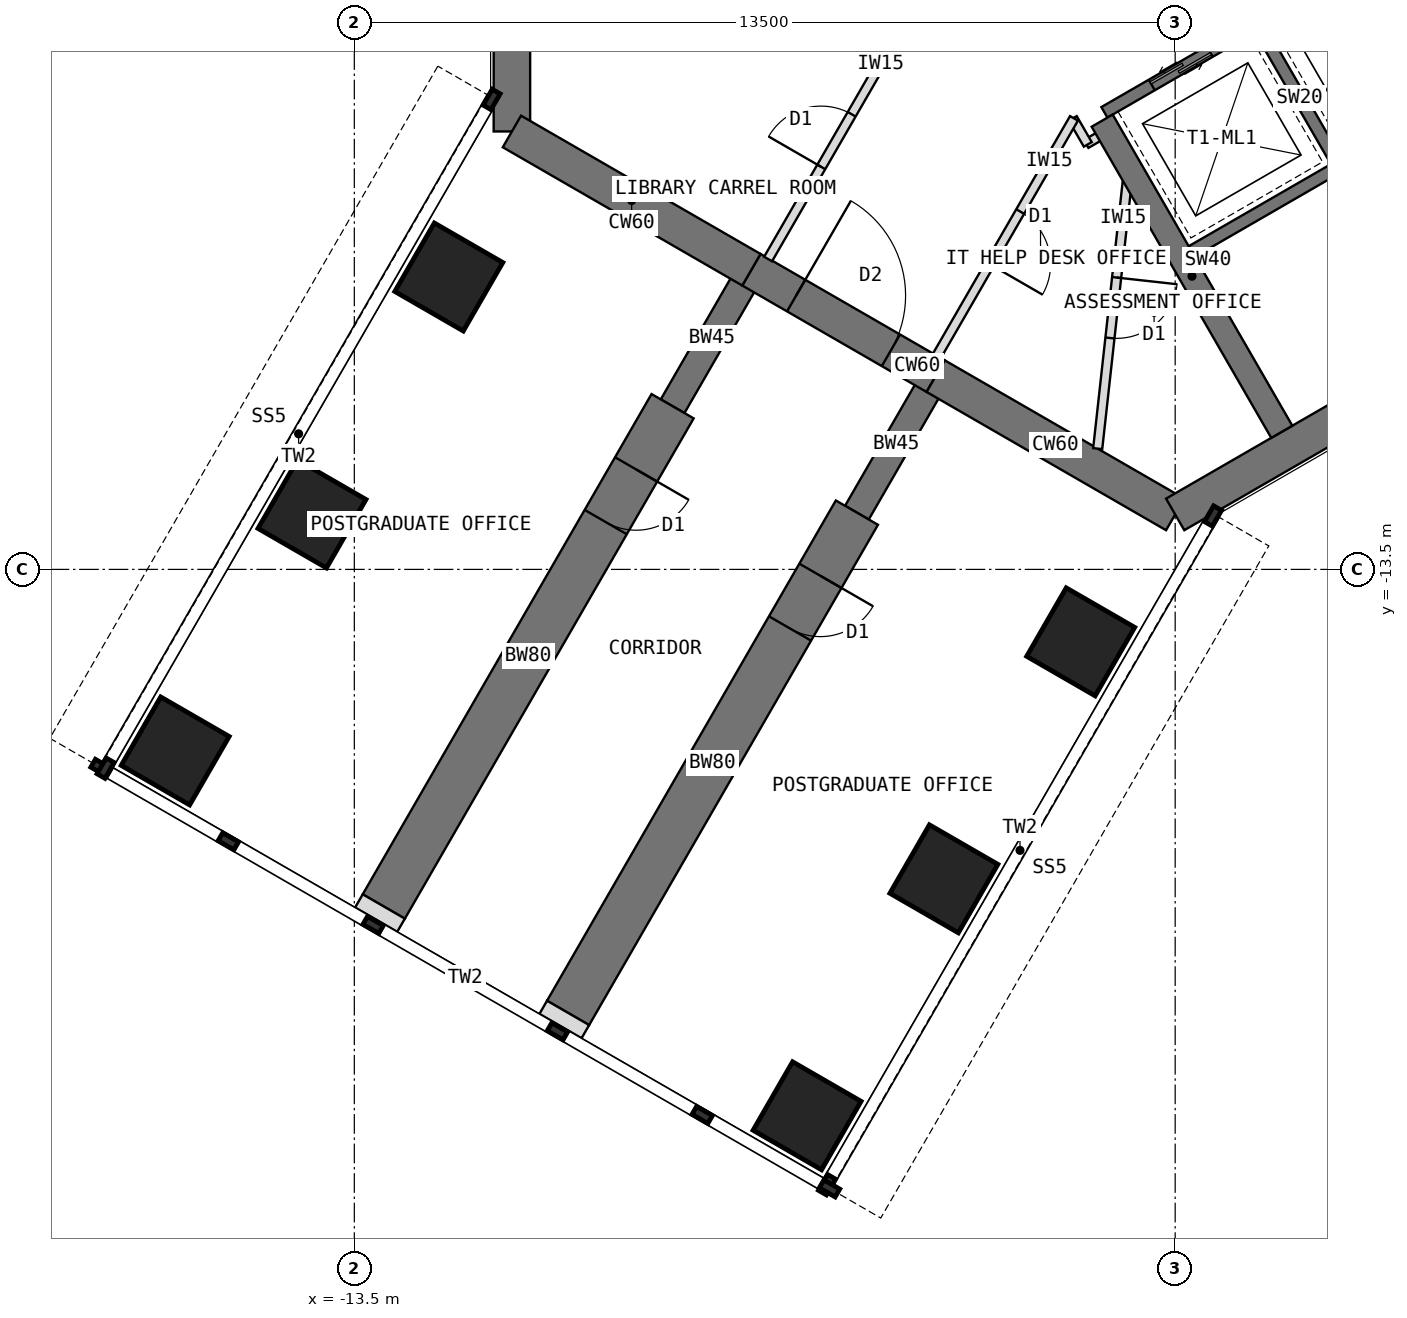
"""IFC4 building model, lengths in metres.
Left out: names, types, materials, properties, quantities, classifications, styles, units other than length and angle.
Written with IfcOpenShell. Run it as: python <this file> out.ifc"""

import sys

from ifc_helpers import new_model, si_unit, direction, frame, frame_2d, origin, origin_2d, place, context, subcontext, project, spatial, rectangle, extrude, element, fill, save


model = new_model("IFC4")
c1 = context("Model", 3, precision=1e-05, world=origin(), true_north=direction((0.0, 1.0)))
c2 = subcontext(c1, "Body", "Model", "MODEL_VIEW")
j1 = project(units=[si_unit("LENGTHUNIT", "METRE"), si_unit("PLANEANGLEUNIT", "RADIAN")], contexts=[c1])
p1 = place(None, origin())
s1 = spatial("IfcSite", under=j1, at=p1, CompositionType="ELEMENT")
p2 = place(p1, origin())
s2 = spatial("IfcBuilding", under=s1, at=p2, CompositionType="ELEMENT")
p3 = place(p2, frame((0.0, 0.0, 121.5)))
s3 = spatial("IfcBuildingStorey", under=s2, at=p3, CompositionType="ELEMENT", Elevation=121.5)
p4 = place(p3, frame((-10.908, 6.298, 0.0), z_axis=(0.0, 0.0, 1.0), x_axis=(0.0, -1.0, 0.0)))
e1 = element("IfcWall", 1, at=p4, inside=s3, PredefinedType="SHEAR", context=c2, shape_type="SweptSolid", body=[
    extrude(rectangle(XDim=12.596, YDim=0.6, at=frame_2d((6.298, 0.0))), origin(), (0.0, 0.0, 1.0), 4.0),
])
p5 = place(p3, frame((-10.908, -6.298, 0.0), z_axis=(0.0, 0.0, 1.0), x_axis=(0.866034513004, -0.499984222037, 0.0)))
e2 = element("IfcWall", 2, at=p5, inside=s3, PredefinedType="SHEAR", context=c2, shape_type="SweptSolid", body=[
    extrude(rectangle(XDim=4.548, YDim=0.6, at=frame_2d((2.274, 0.0))), origin(), (0.0, 0.0, 1.0), 4.0),
])
p6 = place(p3, frame((-6.97, -8.572, 0.0), z_axis=(0.0, 0.0, 1.0), x_axis=(0.866019471182, -0.500010275428, 0.0)))
e3 = element("IfcWall", 3, at=p6, inside=s3, PredefinedType="SHEAR", context=c2, shape_type="SweptSolid", body=[
    extrude(rectangle(XDim=3.5, YDim=0.6, at=frame_2d((1.75, 0.0))), origin(), (0.0, 0.0, 1.0), 4.0),
])
p7 = place(p6, frame((0.85, 0.0, 0.0)))
e4 = element("IfcOpeningElement", 4, at=p7, cuts=e3, PredefinedType="OPENING", context=c2, shape_type="SweptSolid", body=[
    extrude(rectangle(XDim=1.8, YDim=2.1, at=frame_2d((0.9, 1.05))), frame((0.0, 0.31, 0.0), z_axis=(0.0, -1.0, 0.0), x_axis=(1.0, 0.0, 0.0)), (0.0, 0.0, 1.0), 0.62),
])
p8 = place(p3, frame((-3.939, -10.322, 0.0), z_axis=(0.0, 0.0, 1.0), x_axis=(0.866011268655, -0.500024481964, 0.0)))
e5 = element("IfcWall", 5, at=p8, inside=s3, PredefinedType="SHEAR", context=c2, shape_type="SweptSolid", body=[
    extrude(rectangle(XDim=4.548, YDim=0.6, at=frame_2d((2.274, 0.0))), origin(), (0.0, 0.0, 1.0), 4.0),
])
p9 = place(p3, frame((0.0, -12.596, 0.0), z_axis=(0.0, 0.0, 1.0), x_axis=(0.866021940709, 0.500005998175, 0.0)))
e6 = element("IfcWall", 6, at=p9, inside=s3, PredefinedType="SHEAR", context=c2, shape_type="SweptSolid", body=[
    extrude(rectangle(XDim=12.596, YDim=0.6, at=frame_2d((6.298, 0.0))), origin(), (0.0, 0.0, 1.0), 4.0),
])
p10 = place(p3, frame((-3.939, -10.322, 0.0), z_axis=(0.0, 0.0, 1.0), x_axis=(-0.499918158782, -0.866072649678, 0.0)))
e7 = element("IfcWall", 7, at=p10, inside=s3, PredefinedType="SHEAR", context=c2, shape_type="SweptSolid", body=[
    extrude(rectangle(XDim=2.592, YDim=0.45, at=frame_2d((1.296, 0.0))), origin(), (0.0, 0.0, 1.0), 4.0),
])
p11 = place(p3, frame((-5.234, -12.566, 0.0), z_axis=(0.0, 0.0, 1.0), x_axis=(-0.499997557548, -0.86602681393, 0.0)))
e8 = element("IfcWall", 8, at=p11, inside=s3, PredefinedType="SHEAR", context=c2, shape_type="SweptSolid", body=[
    extrude(rectangle(XDim=9.5, YDim=0.8, at=frame_2d((4.75, 0.0))), origin(), (0.0, 0.0, 1.0), 4.0),
])
p12 = place(p11, frame((1.2, 0.0, 0.0)))
e9 = element("IfcOpeningElement", 9, at=p12, cuts=e8, PredefinedType="OPENING", context=c2, shape_type="SweptSolid", body=[
    extrude(rectangle(XDim=1.0, YDim=2.1, at=frame_2d((0.5, 1.05))), frame((0.0, 0.41, 0.0), z_axis=(0.0, -1.0, 0.0), x_axis=(1.0, 0.0, 0.0)), (0.0, 0.0, 1.0), 0.82),
])
p13 = place(p3, frame((-6.97, -8.572, 0.0), z_axis=(0.0, 0.0, 1.0), x_axis=(-0.499988811324, -0.866031863473, 0.0)))
e10 = element("IfcWall", 10, at=p13, inside=s3, PredefinedType="SHEAR", context=c2, shape_type="SweptSolid", body=[
    extrude(rectangle(XDim=2.592, YDim=0.45, at=frame_2d((1.296, 0.0))), origin(), (0.0, 0.0, 1.0), 4.0),
])
p14 = place(p3, frame((-8.266, -10.816, 0.0), z_axis=(0.0, 0.0, 1.0), x_axis=(-0.499997557548, -0.86602681393, 0.0)))
e11 = element("IfcWall", 11, at=p14, inside=s3, PredefinedType="SHEAR", context=c2, shape_type="SweptSolid", body=[
    extrude(rectangle(XDim=9.5, YDim=0.8, at=frame_2d((4.75, 0.0))), origin(), (0.0, 0.0, 1.0), 4.0),
])
p15 = place(p14, frame((1.2, 0.0, 0.0)))
e12 = element("IfcOpeningElement", 12, at=p15, cuts=e11, PredefinedType="OPENING", context=c2, shape_type="SweptSolid", body=[
    extrude(rectangle(XDim=1.0, YDim=2.1, at=frame_2d((0.5, 1.05))), frame((0.0, 0.41, 0.0), z_axis=(0.0, -1.0, 0.0), x_axis=(1.0, 0.0, 0.0)), (0.0, 0.0, 1.0), 0.82),
])
for number, where, z_axis, x_axis in (
    (13, (-1.554, -14.691, 0.0), (0.0, 0.0, 1.0), (0.5, 0.866, 0.0)),
    (14, (-11.946, -8.691, 0.0), (0.0, 0.0, 1.0), (0.5, 0.866, 0.0)),
    (15, (-3.804, -18.588, 0.0), (0.0, 0.0, 1.0), (0.5, 0.866, 0.0)),
    (16, (-14.196, -12.588, 0.0), (0.0, 0.0, 1.0), (0.5, 0.866, 0.0)),
    (17, (-6.054, -22.486, 0.0), (0.0, 0.0, 1.0), (0.5, 0.866, 0.0)),
    (18, (-16.446, -16.486, 0.0), (0.0, 0.0, 1.0), (0.5, 0.866, 0.0)),
):
    element("IfcColumn", number, at=place(p3, frame(where, z_axis=z_axis, x_axis=x_axis)), inside=s3, PredefinedType="COLUMN", context=c2, shape_type="SweptSolid", body=[
        extrude(rectangle(XDim=1.3, YDim=1.3, at=origin_2d()), origin(), (0.0, 0.0, 1.0), 4.0),
    ])
for number, where, z_axis, x_axis in (
    (19, (-9.984, -20.794, 0.0), (0.0, 0.0, 1.0), (-0.5, -0.866, 0.0)),
    (20, (-13.016, -19.044, 0.0), (0.0, 0.0, 1.0), (-0.5, -0.866, 0.0)),
):
    element("IfcWall", number, at=place(p3, frame(where, z_axis=z_axis, x_axis=x_axis)), inside=s3, PredefinedType="PARTITIONING", context=c2, shape_type="SweptSolid", body=[
        extrude(rectangle(XDim=0.25, YDim=0.8, at=frame_2d((0.125, 0.0))), origin(), (0.0, 0.0, 1.0), 3.8),
    ])
p16 = place(p3, frame((-1.164, -5.984, 0.0), z_axis=(0.0, 0.0, 1.0), x_axis=(0.866026010844, 0.49999894854, 0.0)))
e21 = element("IfcWall", 21, at=p16, inside=s3, PredefinedType="SHEAR", context=c2, shape_type="SweptSolid", body=[
    extrude(rectangle(XDim=8.0, YDim=0.2, at=frame_2d((4.0, 0.0))), origin(), (0.0, 0.0, 1.0), 4.0),
])
p17 = place(p16, frame((6.3, 0.0, 0.0)))
e22 = element("IfcOpeningElement", 22, at=p17, cuts=e21, PredefinedType="OPENING", context=c2, shape_type="SweptSolid", body=[
    extrude(rectangle(XDim=1.2, YDim=2.1, at=frame_2d((0.6, 1.05))), frame((0.0, 0.11, 0.0), z_axis=(0.0, -1.0, 0.0), x_axis=(1.0, 0.0, 0.0)), (0.0, 0.0, 1.0), 0.22),
])
p18 = place(p16, frame((0.9, 0.0, 0.0)))
e23 = element("IfcOpeningElement", 23, at=p18, cuts=e21, PredefinedType="OPENING", context=c2, shape_type="SweptSolid", body=[
    extrude(rectangle(XDim=1.1, YDim=2.2, at=frame_2d((0.55, 1.1))), frame((0.0, 0.11, 0.0), z_axis=(0.0, -1.0, 0.0), x_axis=(1.0, 0.0, 0.0)), (0.0, 0.0, 1.0), 0.22),
])
p19 = place(p16, frame((3.8, 0.0, 0.0)))
e24 = element("IfcOpeningElement", 24, at=p19, cuts=e21, PredefinedType="OPENING", context=c2, shape_type="SweptSolid", body=[
    extrude(rectangle(XDim=1.1, YDim=2.2, at=frame_2d((0.55, 1.1))), frame((0.0, 0.11, 0.0), z_axis=(0.0, -1.0, 0.0), x_axis=(1.0, 0.0, 0.0)), (0.0, 0.0, 1.0), 0.22),
])
p20 = place(p3, frame((1.397, -4.62, 0.0), z_axis=(0.0, 0.0, 1.0), x_axis=(0.499936506574, -0.866062058628, 0.0)))
e25 = element("IfcWall", 25, at=p20, inside=s3, PredefinedType="SHEAR", context=c2, shape_type="SweptSolid", body=[
    extrude(rectangle(XDim=2.6, YDim=0.2, at=frame_2d((1.3, 0.0))), origin(), (0.0, 0.0, 1.0), 4.0),
])
p21 = place(p3, frame((0.186, -8.322, 0.0), z_axis=(0.0, 0.0, 1.0), x_axis=(0.866026010844, 0.49999894854, 0.0)))
e26 = element("IfcWall", 26, at=p21, inside=s3, PredefinedType="SHEAR", context=c2, shape_type="SweptSolid", body=[
    extrude(rectangle(XDim=8.0, YDim=0.2, at=frame_2d((4.0, 0.0))), origin(), (0.0, 0.0, 1.0), 4.0),
])
p22 = place(p21, frame((6.7, 0.0, 0.0)))
e27 = element("IfcOpeningElement", 27, at=p22, cuts=e26, PredefinedType="OPENING", context=c2, shape_type="SweptSolid", body=[
    extrude(rectangle(XDim=1.1, YDim=2.1, at=frame_2d((0.55, 1.05))), frame((0.0, 0.11, 0.0), z_axis=(0.0, -1.0, 0.0), x_axis=(1.0, 0.0, 0.0)), (0.0, 0.0, 1.0), 0.22),
])
p23 = place(p3, frame((-1.201, -6.12, 0.0), z_axis=(0.0, 0.0, 1.0), x_axis=(0.49999668571, -0.866027317282, 0.0)))
e28 = element("IfcWall", 28, at=p23, inside=s3, PredefinedType="SHEAR", context=c2, shape_type="SweptSolid", body=[
    extrude(rectangle(XDim=5.908, YDim=0.4, at=frame_2d((2.954, 0.0))), origin(), (0.0, 0.0, 1.0), 4.0),
])
p24 = place(p3, frame((-1.092, -6.289, 0.0), z_axis=(0.0, 0.0, 1.0), x_axis=(-0.866138304741, -0.499804398801, 0.0)))
e29 = element("IfcWall", 29, at=p24, inside=s3, PredefinedType="PARTITIONING", context=c2, shape_type="SweptSolid", body=[
    extrude(rectangle(XDim=0.43, YDim=0.15, at=frame_2d((0.215, 0.0))), origin(), (0.0, 0.0, 1.0), 3.8),
])
p25 = place(p3, frame((-1.437, -6.511, 0.0), z_axis=(0.0, 0.0, 1.0), x_axis=(-0.50033519877, 0.865831790172, 0.0)))
e30 = element("IfcWall", 30, at=p25, inside=s3, PredefinedType="PARTITIONING", context=c2, shape_type="SweptSolid", body=[
    extrude(rectangle(XDim=0.494, YDim=0.15, at=frame_2d((0.247, 0.0))), origin(), (0.0, 0.0, 1.0), 3.8),
])
p26 = place(p3, frame((-1.664, -6.083, 0.0), z_axis=(0.0, 0.0, 1.0), x_axis=(-0.500032713409, -0.866006515865, 0.0)))
e31 = element("IfcWall", 31, at=p26, inside=s3, PredefinedType="PARTITIONING", context=c2, shape_type="SweptSolid", body=[
    extrude(rectangle(XDim=4.518, YDim=0.15, at=frame_2d((2.259, 0.0))), origin(), (0.0, 0.0, 1.0), 3.8),
])
p27 = place(p26, frame((1.769, 0.0, 0.0)))
e32 = element("IfcOpeningElement", 32, at=p27, cuts=e31, PredefinedType="OPENING", context=c2, shape_type="SweptSolid", body=[
    extrude(rectangle(XDim=1.0, YDim=2.1, at=frame_2d((0.5, 1.05))), frame((0.0, 0.085, 0.0), z_axis=(0.0, -1.0, 0.0), x_axis=(1.0, 0.0, 0.0)), (0.0, 0.0, 1.0), 0.17),
])
p28 = place(p3, frame((-6.695, -8.396, 0.0), z_axis=(0.0, 0.0, 1.0), x_axis=(0.500009315796, 0.86602002524, 0.0)))
e33 = element("IfcWall", 33, at=p28, inside=s3, PredefinedType="PARTITIONING", context=c2, shape_type="SweptSolid", body=[
    extrude(rectangle(XDim=4.519, YDim=0.15, at=frame_2d((2.259, 0.0))), origin(), (0.0, 0.0, 1.0), 3.8),
])
p29 = place(p28, frame((1.749, 0.0, 0.0)))
e34 = element("IfcOpeningElement", 34, at=p29, cuts=e33, PredefinedType="OPENING", context=c2, shape_type="SweptSolid", body=[
    extrude(rectangle(XDim=1.0, YDim=2.1, at=frame_2d((0.5, 1.05))), frame((0.0, 0.085, 0.0), z_axis=(0.0, -1.0, 0.0), x_axis=(1.0, 0.0, 0.0)), (0.0, 0.0, 1.0), 0.17),
])
p30 = place(p3, frame((-0.761, -6.881, 0.0), z_axis=(0.0, 0.0, 1.0), x_axis=(-0.109994603044, -0.993932184458, 0.0)))
e35 = element("IfcWall", 35, at=p30, inside=s3, PredefinedType="PARTITIONING", context=c2, shape_type="SweptSolid", body=[
    extrude(rectangle(XDim=4.661, YDim=0.15, at=frame_2d((2.331, 0.0))), origin(), (0.0, 0.0, 1.0), 3.8),
])
p31 = place(p30, frame((1.831, 0.0, 0.0)))
e36 = element("IfcOpeningElement", 36, at=p31, cuts=e35, PredefinedType="OPENING", context=c2, shape_type="SweptSolid", body=[
    extrude(rectangle(XDim=1.0, YDim=2.1, at=frame_2d((0.5, 1.05))), frame((0.0, 0.085, 0.0), z_axis=(0.0, -1.0, 0.0), x_axis=(1.0, 0.0, 0.0)), (0.0, 0.0, 1.0), 0.17),
])
p32 = place(p18, origin())
e37 = element("IfcDoor", 37, at=p32, inside=s3, OperationType="DOUBLE_DOOR_SLIDING", PredefinedType="DOOR", context=c2, shape_type="SweptSolid", body=[
    extrude(rectangle(XDim=1.1, YDim=2.2, at=frame_2d((0.55, 1.1))), frame((0.0, 0.025, 0.0), z_axis=(0.0, -1.0, 0.0), x_axis=(1.0, 0.0, 0.0)), (0.0, 0.0, 1.0), 0.05),
])
fill(e23, e37)
p33 = place(p7, origin())
e38 = element("IfcDoor", 38, at=p33, inside=s3, OperationType="DOUBLE_DOOR_DOUBLE_SWING", PredefinedType="DOOR", context=c2, shape_type="SweptSolid", body=[
    extrude(rectangle(XDim=1.72, YDim=2.06, at=frame_2d((0.9, 1.03))), frame((0.0, 0.025, 0.0), z_axis=(0.0, -1.0, 0.0), x_axis=(1.0, 0.0, 0.0)), (0.0, 0.0, 1.0), 0.05),
    extrude(rectangle(XDim=0.04, YDim=2.1, at=frame_2d((0.02, 1.05))), frame((0.0, 0.3, 0.0), z_axis=(0.0, -1.0, 0.0), x_axis=(1.0, 0.0, 0.0)), (0.0, 0.0, 1.0), 0.6),
    extrude(rectangle(XDim=0.04, YDim=2.1, at=frame_2d((1.78, 1.05))), frame((0.0, 0.3, 0.0), z_axis=(0.0, -1.0, 0.0), x_axis=(1.0, 0.0, 0.0)), (0.0, 0.0, 1.0), 0.6),
    extrude(rectangle(XDim=1.72, YDim=0.04, at=frame_2d((0.9, 2.08))), frame((0.0, 0.3, 0.0), z_axis=(0.0, -1.0, 0.0), x_axis=(1.0, 0.0, 0.0)), (0.0, 0.0, 1.0), 0.6),
])
fill(e4, e38)
p34 = place(p29, origin())
e39 = element("IfcDoor", 39, at=p34, inside=s3, OperationType="SINGLE_SWING_LEFT", PredefinedType="DOOR", context=c2, shape_type="SweptSolid", body=[
    extrude(rectangle(XDim=1.0, YDim=2.1, at=frame_2d((0.5, 1.05))), frame((0.0, 0.025, 0.0), z_axis=(0.0, -1.0, 0.0), x_axis=(1.0, 0.0, 0.0)), (0.0, 0.0, 1.0), 0.05),
])
fill(e34, e39)
p35 = place(p27, origin())
e40 = element("IfcDoor", 40, at=p35, inside=s3, OperationType="SINGLE_SWING_RIGHT", PredefinedType="DOOR", context=c2, shape_type="SweptSolid", body=[
    extrude(rectangle(XDim=1.0, YDim=2.1, at=frame_2d((0.5, 1.05))), frame((0.0, 0.025, 0.0), z_axis=(0.0, -1.0, 0.0), x_axis=(1.0, 0.0, 0.0)), (0.0, 0.0, 1.0), 0.05),
])
fill(e32, e40)
p36 = place(p31, origin())
e41 = element("IfcDoor", 41, at=p36, inside=s3, OperationType="SINGLE_SWING_LEFT", PredefinedType="DOOR", context=c2, shape_type="SweptSolid", body=[
    extrude(rectangle(XDim=1.0, YDim=2.1, at=frame_2d((0.5, 1.05))), frame((0.0, 0.025, 0.0), z_axis=(0.0, -1.0, 0.0), x_axis=(1.0, 0.0, 0.0)), (0.0, 0.0, 1.0), 0.05),
])
fill(e36, e41)
p37 = place(p12, origin())
e42 = element("IfcDoor", 42, at=p37, inside=s3, OperationType="SINGLE_SWING_LEFT", PredefinedType="DOOR", context=c2, shape_type="SweptSolid", body=[
    extrude(rectangle(XDim=0.92, YDim=2.06, at=frame_2d((0.5, 1.03))), frame((0.0, 0.025, 0.0), z_axis=(0.0, -1.0, 0.0), x_axis=(1.0, 0.0, 0.0)), (0.0, 0.0, 1.0), 0.05),
    extrude(rectangle(XDim=0.04, YDim=2.1, at=frame_2d((0.02, 1.05))), frame((0.0, 0.4, 0.0), z_axis=(0.0, -1.0, 0.0), x_axis=(1.0, 0.0, 0.0)), (0.0, 0.0, 1.0), 0.8),
    extrude(rectangle(XDim=0.04, YDim=2.1, at=frame_2d((0.98, 1.05))), frame((0.0, 0.4, 0.0), z_axis=(0.0, -1.0, 0.0), x_axis=(1.0, 0.0, 0.0)), (0.0, 0.0, 1.0), 0.8),
    extrude(rectangle(XDim=0.92, YDim=0.04, at=frame_2d((0.5, 2.08))), frame((0.0, 0.4, 0.0), z_axis=(0.0, -1.0, 0.0), x_axis=(1.0, 0.0, 0.0)), (0.0, 0.0, 1.0), 0.8),
])
fill(e9, e42)
p38 = place(p15, origin())
e43 = element("IfcDoor", 43, at=p38, inside=s3, OperationType="SINGLE_SWING_LEFT", PredefinedType="DOOR", context=c2, shape_type="SweptSolid", body=[
    extrude(rectangle(XDim=0.92, YDim=2.06, at=frame_2d((0.5, 1.03))), frame((0.0, 0.025, 0.0), z_axis=(0.0, -1.0, 0.0), x_axis=(1.0, 0.0, 0.0)), (0.0, 0.0, 1.0), 0.05),
    extrude(rectangle(XDim=0.04, YDim=2.1, at=frame_2d((0.02, 1.05))), frame((0.0, 0.4, 0.0), z_axis=(0.0, -1.0, 0.0), x_axis=(1.0, 0.0, 0.0)), (0.0, 0.0, 1.0), 0.8),
    extrude(rectangle(XDim=0.04, YDim=2.1, at=frame_2d((0.98, 1.05))), frame((0.0, 0.4, 0.0), z_axis=(0.0, -1.0, 0.0), x_axis=(1.0, 0.0, 0.0)), (0.0, 0.0, 1.0), 0.8),
    extrude(rectangle(XDim=0.92, YDim=0.04, at=frame_2d((0.5, 2.08))), frame((0.0, 0.4, 0.0), z_axis=(0.0, -1.0, 0.0), x_axis=(1.0, 0.0, 0.0)), (0.0, 0.0, 1.0), 0.8),
])
fill(e12, e43)
save(model, sys.argv[1])
